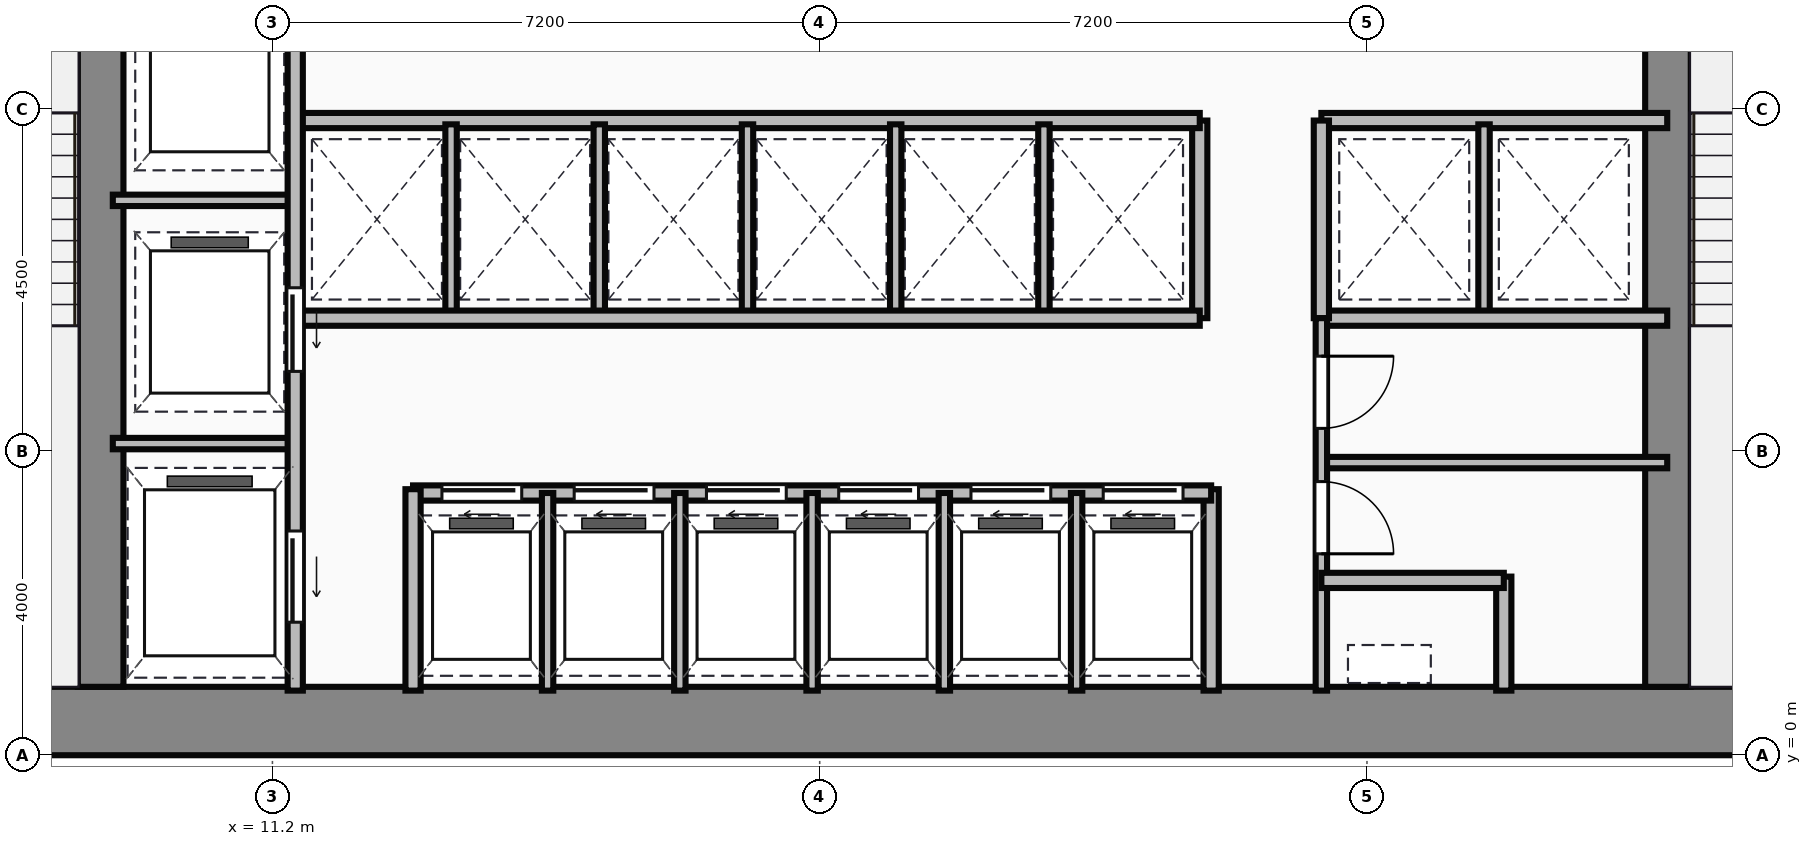
"""IFC4 building model, lengths in metres.
Left out: names, types, materials, properties, quantities, classifications, styles, units other than length and angle.
Written with IfcOpenShell. Run it as: python <this file> out.ifc"""

import sys

from ifc_helpers import new_model, si_unit, direction, frame, frame_2d, origin, place, context, subcontext, project, spatial, rectangle, extrude, source, transform, mapped, element, fill, save


model = new_model("IFC4")
c1 = context("Model", 3, precision=1e-05, world=origin(), true_north=direction((0.0, 1.0)))
c2 = subcontext(c1, "Body", "Model", "MODEL_VIEW")
j1 = project(units=[si_unit("LENGTHUNIT", "METRE"), si_unit("PLANEANGLEUNIT", "RADIAN")], contexts=[c1])
p1 = place(None, origin())
s1 = spatial("IfcSite", under=j1, at=p1, CompositionType="ELEMENT")
p2 = place(p1, origin())
s2 = spatial("IfcBuilding", under=s1, at=p2, CompositionType="ELEMENT")
p3 = place(p2, frame((0.0, 0.0, 47.1)))
s3 = spatial("IfcBuildingStorey", under=s2, at=p3, CompositionType="ELEMENT", Elevation=47.1)
m1 = source(origin(), c2, "Body", "SweptSolid", [
    extrude(rectangle(XDim=29.5, YDim=0.9, at=frame_2d((14.75, 0.0))), origin(), (0.0, 0.0, 1.0), 3.65),
])
p4 = place(p3, frame((4.5, 0.45, 0.0), z_axis=(0.0, 0.0, 1.0), x_axis=(1.0, 0.0, 0.0)))
e1 = element("IfcWall", 1, at=p4, inside=s3, PredefinedType="SHEAR", context=c2, shape_type="MappedRepresentation", body=[
    mapped(m1, transform((0.0, 0.0, 0.0))),
])
m2 = source(origin(), c2, "Body", "SweptSolid", [
    extrude(rectangle(XDim=12.2, YDim=0.6, at=frame_2d((6.1, 0.0))), origin(), (0.0, 0.0, 1.0), 3.65),
])
for number, where, z_axis, x_axis in (
    (2, (8.94, 0.9, 0.0), (0.0, 0.0, 1.0), (0.0, 1.0, 0.0)),
    (3, (29.56, 0.9, 0.0), (0.0, 0.0, 1.0), (0.0, 1.0, 0.0)),
):
    element("IfcWall", number, at=place(p3, frame(where, z_axis=z_axis, x_axis=x_axis)), inside=s3, PredefinedType="SHEAR", context=c2, shape_type="MappedRepresentation", body=[
        mapped(m2, transform((0.0, 0.0, 0.0))),
    ])
m3 = source(origin(), c2, "Body", "SweptSolid", [
    extrude(rectangle(XDim=9.6, YDim=0.2, at=frame_2d((4.8, 0.0))), origin(), (0.0, 0.0, 1.0), 3.4),
])
p5 = place(p3, frame((11.5, 0.85, 0.0), z_axis=(0.0, 0.0, 1.0), x_axis=(0.0, 1.0, 0.0)))
e4 = element("IfcWall", 4, at=p5, inside=s3, PredefinedType="PARTITIONING", context=c2, shape_type="MappedRepresentation", body=[
    mapped(m3, transform((0.0, 0.0, 0.0))),
])
p6 = place(p5, frame((4.2, 0.0, 0.0)))
e5 = element("IfcOpeningElement", 5, at=p6, cuts=e4, PredefinedType="OPENING", context=c2, shape_type="SweptSolid", body=[
    extrude(rectangle(XDim=1.1, YDim=2.15, at=frame_2d((0.55, 1.075))), frame((0.0, 0.11, 0.0), z_axis=(0.0, -1.0, 0.0), x_axis=(1.0, 0.0, 0.0)), (0.0, 0.0, 1.0), 0.22),
])
p7 = place(p5, frame((0.9, 0.0, 0.0)))
e6 = element("IfcOpeningElement", 6, at=p7, cuts=e4, PredefinedType="OPENING", context=c2, shape_type="SweptSolid", body=[
    extrude(rectangle(XDim=1.2, YDim=2.15, at=frame_2d((0.6, 1.075))), frame((0.0, 0.11, 0.0), z_axis=(0.0, -1.0, 0.0), x_axis=(1.0, 0.0, 0.0)), (0.0, 0.0, 1.0), 0.22),
])
m4 = source(origin(), c2, "Body", "SweptSolid", [
    extrude(rectangle(XDim=2.4, YDim=0.15, at=frame_2d((1.2, 0.0))), origin(), (0.0, 0.0, 1.0), 3.4),
])
for number, where, z_axis, x_axis in (
    (7, (9.1, 4.1, 0.0), (0.0, 0.0, 1.0), (1.0, 0.0, 0.0)),
    (8, (9.1, 7.3, 0.0), (0.0, 0.0, 1.0), (1.0, 0.0, 0.0)),
):
    element("IfcWall", number, at=place(p3, frame(where, z_axis=z_axis, x_axis=x_axis)), inside=s3, PredefinedType="PARTITIONING", context=c2, shape_type="MappedRepresentation", body=[
        mapped(m4, transform((0.0, 0.0, 0.0))),
    ])
m5 = source(origin(), c2, "Body", "SweptSolid", [
    extrude(rectangle(XDim=2.65, YDim=0.2, at=frame_2d((1.325, 0.0))), origin(), (0.0, 0.0, 1.0), 3.4),
])
p8 = place(p3, frame((13.05, 0.85, 0.0), z_axis=(0.0, 0.0, 1.0), x_axis=(0.0, 1.0, 0.0)))
e9 = element("IfcWall", 9, at=p8, inside=s3, PredefinedType="PARTITIONING", context=c2, shape_type="MappedRepresentation", body=[
    mapped(m5, transform((0.0, 0.0, 0.0))),
])
m6 = source(origin(), c2, "Body", "SweptSolid", [
    extrude(rectangle(XDim=10.5, YDim=0.2, at=frame_2d((5.25, 0.0))), origin(), (0.0, 0.0, 1.0), 3.4),
])
p9 = place(p3, frame((13.05, 3.45, 0.0), z_axis=(0.0, 0.0, 1.0), x_axis=(1.0, 0.0, 0.0)))
e10 = element("IfcWall", 10, at=p9, inside=s3, PredefinedType="PARTITIONING", context=c2, shape_type="MappedRepresentation", body=[
    mapped(m6, transform((0.0, 0.0, 0.0))),
])
p10 = place(p9, frame((0.38, 0.0, 0.0)))
e11 = element("IfcOpeningElement", 11, at=p10, cuts=e10, PredefinedType="OPENING", context=c2, shape_type="SweptSolid", body=[
    extrude(rectangle(XDim=1.05, YDim=2.15, at=frame_2d((0.525, 1.075))), frame((0.0, 0.11, 0.0), z_axis=(0.0, -1.0, 0.0), x_axis=(1.0, 0.0, 0.0)), (0.0, 0.0, 1.0), 0.22),
])
p11 = place(p9, frame((2.12, 0.0, 0.0)))
e12 = element("IfcOpeningElement", 12, at=p11, cuts=e10, PredefinedType="OPENING", context=c2, shape_type="SweptSolid", body=[
    extrude(rectangle(XDim=1.05, YDim=2.15, at=frame_2d((0.525, 1.075))), frame((0.0, 0.11, 0.0), z_axis=(0.0, -1.0, 0.0), x_axis=(1.0, 0.0, 0.0)), (0.0, 0.0, 1.0), 0.22),
])
p12 = place(p9, frame((3.86, 0.0, 0.0)))
e13 = element("IfcOpeningElement", 13, at=p12, cuts=e10, PredefinedType="OPENING", context=c2, shape_type="SweptSolid", body=[
    extrude(rectangle(XDim=1.05, YDim=2.15, at=frame_2d((0.525, 1.075))), frame((0.0, 0.11, 0.0), z_axis=(0.0, -1.0, 0.0), x_axis=(1.0, 0.0, 0.0)), (0.0, 0.0, 1.0), 0.22),
])
p13 = place(p9, frame((5.6, 0.0, 0.0)))
e14 = element("IfcOpeningElement", 14, at=p13, cuts=e10, PredefinedType="OPENING", context=c2, shape_type="SweptSolid", body=[
    extrude(rectangle(XDim=1.05, YDim=2.15, at=frame_2d((0.525, 1.075))), frame((0.0, 0.11, 0.0), z_axis=(0.0, -1.0, 0.0), x_axis=(1.0, 0.0, 0.0)), (0.0, 0.0, 1.0), 0.22),
])
p14 = place(p9, frame((7.34, 0.0, 0.0)))
e15 = element("IfcOpeningElement", 15, at=p14, cuts=e10, PredefinedType="OPENING", context=c2, shape_type="SweptSolid", body=[
    extrude(rectangle(XDim=1.05, YDim=2.15, at=frame_2d((0.525, 1.075))), frame((0.0, 0.11, 0.0), z_axis=(0.0, -1.0, 0.0), x_axis=(1.0, 0.0, 0.0)), (0.0, 0.0, 1.0), 0.22),
])
p15 = place(p9, frame((9.08, 0.0, 0.0)))
e16 = element("IfcOpeningElement", 16, at=p15, cuts=e10, PredefinedType="OPENING", context=c2, shape_type="SweptSolid", body=[
    extrude(rectangle(XDim=1.05, YDim=2.15, at=frame_2d((0.525, 1.075))), frame((0.0, 0.11, 0.0), z_axis=(0.0, -1.0, 0.0), x_axis=(1.0, 0.0, 0.0)), (0.0, 0.0, 1.0), 0.22),
])
p16 = place(p3, frame((23.55, 0.85, 0.0), z_axis=(0.0, 0.0, 1.0), x_axis=(0.0, 1.0, 0.0)))
e17 = element("IfcWall", 17, at=p16, inside=s3, PredefinedType="PARTITIONING", context=c2, shape_type="MappedRepresentation", body=[
    mapped(m5, transform((0.0, 0.0, 0.0))),
])
m7 = source(origin(), c2, "Body", "SweptSolid", [
    extrude(rectangle(XDim=2.6, YDim=0.15, at=frame_2d((1.3, 0.0))), origin(), (0.0, 0.0, 1.0), 3.4),
])
for number, where, z_axis, x_axis in (
    (18, (14.82, 0.85, 0.0), (0.0, 0.0, 1.0), (0.0, 1.0, 0.0)),
    (19, (16.56, 0.85, 0.0), (0.0, 0.0, 1.0), (0.0, 1.0, 0.0)),
    (20, (18.3, 0.85, 0.0), (0.0, 0.0, 1.0), (0.0, 1.0, 0.0)),
    (21, (20.04, 0.85, 0.0), (0.0, 0.0, 1.0), (0.0, 1.0, 0.0)),
    (22, (21.78, 0.85, 0.0), (0.0, 0.0, 1.0), (0.0, 1.0, 0.0)),
):
    element("IfcWall", number, at=place(p3, frame(where, z_axis=z_axis, x_axis=x_axis)), inside=s3, PredefinedType="PARTITIONING", context=c2, shape_type="MappedRepresentation", body=[
        mapped(m7, transform((0.0, 0.0, 0.0))),
    ])
m8 = source(origin(), c2, "Body", "SweptSolid", [
    extrude(rectangle(XDim=11.85, YDim=0.2, at=frame_2d((5.925, 0.0))), origin(), (0.0, 0.0, 1.0), 3.4),
])
for number, where, z_axis, x_axis in (
    (23, (11.55, 5.75, 0.0), (0.0, 0.0, 1.0), (1.0, 0.0, 0.0)),
    (24, (11.55, 8.35, 0.0), (0.0, 0.0, 1.0), (1.0, 0.0, 0.0)),
):
    element("IfcWall", number, at=place(p3, frame(where, z_axis=z_axis, x_axis=x_axis)), inside=s3, PredefinedType="PARTITIONING", context=c2, shape_type="MappedRepresentation", body=[
        mapped(m8, transform((0.0, 0.0, 0.0))),
    ])
m9 = source(origin(), c2, "Body", "SweptSolid", [
    extrude(rectangle(XDim=2.6, YDim=0.2, at=frame_2d((1.3, 0.0))), origin(), (0.0, 0.0, 1.0), 3.4),
])
p17 = place(p3, frame((23.4, 5.75, 0.0), z_axis=(0.0, 0.0, 1.0), x_axis=(0.0, 1.0, 0.0)))
e25 = element("IfcWall", 25, at=p17, inside=s3, PredefinedType="PARTITIONING", context=c2, shape_type="MappedRepresentation", body=[
    mapped(m9, transform((0.0, 0.0, 0.0))),
])
m10 = source(origin(), c2, "Body", "SweptSolid", [
    extrude(rectangle(XDim=2.5, YDim=0.15, at=frame_2d((1.25, 0.0))), origin(), (0.0, 0.0, 1.0), 3.4),
])
for number, where, z_axis, x_axis in (
    (26, (13.55, 5.8, 0.0), (0.0, 0.0, 1.0), (0.0, 1.0, 0.0)),
    (27, (15.5, 5.8, 0.0), (0.0, 0.0, 1.0), (0.0, 1.0, 0.0)),
    (28, (17.45, 5.8, 0.0), (0.0, 0.0, 1.0), (0.0, 1.0, 0.0)),
    (29, (19.4, 5.8, 0.0), (0.0, 0.0, 1.0), (0.0, 1.0, 0.0)),
    (30, (21.35, 5.8, 0.0), (0.0, 0.0, 1.0), (0.0, 1.0, 0.0)),
):
    element("IfcWall", number, at=place(p3, frame(where, z_axis=z_axis, x_axis=x_axis)), inside=s3, PredefinedType="PARTITIONING", context=c2, shape_type="MappedRepresentation", body=[
        mapped(m10, transform((0.0, 0.0, 0.0))),
    ])
m11 = source(origin(), c2, "Body", "SweptSolid", [
    extrude(rectangle(XDim=4.55, YDim=0.2, at=frame_2d((2.275, 0.0))), origin(), (0.0, 0.0, 1.0), 3.4),
])
for number, where, z_axis, x_axis in (
    (31, (25.0, 8.35, 0.0), (0.0, 0.0, 1.0), (1.0, 0.0, 0.0)),
    (32, (25.0, 5.75, 0.0), (0.0, 0.0, 1.0), (1.0, 0.0, 0.0)),
):
    element("IfcWall", number, at=place(p3, frame(where, z_axis=z_axis, x_axis=x_axis)), inside=s3, PredefinedType="PARTITIONING", context=c2, shape_type="MappedRepresentation", body=[
        mapped(m11, transform((0.0, 0.0, 0.0))),
    ])
p18 = place(p3, frame((25.0, 5.75, 0.0), z_axis=(0.0, 0.0, 1.0), x_axis=(0.0, 1.0, 0.0)))
e33 = element("IfcWall", 33, at=p18, inside=s3, PredefinedType="PARTITIONING", context=c2, shape_type="MappedRepresentation", body=[
    mapped(m9, transform((0.0, 0.0, 0.0))),
])
p19 = place(p3, frame((27.14, 5.8, 0.0), z_axis=(0.0, 0.0, 1.0), x_axis=(0.0, 1.0, 0.0)))
e34 = element("IfcWall", 34, at=p19, inside=s3, PredefinedType="PARTITIONING", context=c2, shape_type="MappedRepresentation", body=[
    mapped(m10, transform((0.0, 0.0, 0.0))),
])
m12 = source(origin(), c2, "Body", "SweptSolid", [
    extrude(rectangle(XDim=4.9, YDim=0.15, at=frame_2d((2.45, 0.0))), origin(), (0.0, 0.0, 1.0), 3.4),
])
p20 = place(p3, frame((25.0, 0.85, 0.0), z_axis=(0.0, 0.0, 1.0), x_axis=(0.0, 1.0, 0.0)))
e35 = element("IfcWall", 35, at=p20, inside=s3, PredefinedType="PARTITIONING", context=c2, shape_type="MappedRepresentation", body=[
    mapped(m12, transform((0.0, 0.0, 0.0))),
])
p21 = place(p20, frame((1.8, 0.0, 0.0)))
e36 = element("IfcOpeningElement", 36, at=p21, cuts=e35, PredefinedType="OPENING", context=c2, shape_type="SweptSolid", body=[
    extrude(rectangle(XDim=0.95, YDim=2.15, at=frame_2d((0.475, 1.075))), frame((0.0, 0.085, 0.0), z_axis=(0.0, -1.0, 0.0), x_axis=(1.0, 0.0, 0.0)), (0.0, 0.0, 1.0), 0.17),
])
p22 = place(p20, frame((3.45, 0.0, 0.0)))
e37 = element("IfcOpeningElement", 37, at=p22, cuts=e35, PredefinedType="OPENING", context=c2, shape_type="SweptSolid", body=[
    extrude(rectangle(XDim=0.95, YDim=2.15, at=frame_2d((0.475, 1.075))), frame((0.0, 0.085, 0.0), z_axis=(0.0, -1.0, 0.0), x_axis=(1.0, 0.0, 0.0)), (0.0, 0.0, 1.0), 0.17),
])
m13 = source(origin(), c2, "Body", "SweptSolid", [
    extrude(rectangle(XDim=2.4, YDim=0.2, at=frame_2d((1.2, 0.0))), origin(), (0.0, 0.0, 1.0), 3.4),
])
p23 = place(p3, frame((25.0, 2.3, 0.0), z_axis=(0.0, 0.0, 1.0), x_axis=(1.0, 0.0, 0.0)))
e38 = element("IfcWall", 38, at=p23, inside=s3, PredefinedType="PARTITIONING", context=c2, shape_type="MappedRepresentation", body=[
    mapped(m13, transform((0.0, 0.0, 0.0))),
])
m14 = source(origin(), c2, "Body", "SweptSolid", [
    extrude(rectangle(XDim=1.5, YDim=0.2, at=frame_2d((0.75, 0.0))), origin(), (0.0, 0.0, 1.0), 3.4),
])
p24 = place(p3, frame((27.4, 0.85, 0.0), z_axis=(0.0, 0.0, 1.0), x_axis=(0.0, 1.0, 0.0)))
e39 = element("IfcWall", 39, at=p24, inside=s3, PredefinedType="PARTITIONING", context=c2, shape_type="MappedRepresentation", body=[
    mapped(m14, transform((0.0, 0.0, 0.0))),
])
m15 = source(origin(), c2, "Body", "SweptSolid", [
    extrude(rectangle(XDim=4.55, YDim=0.15, at=frame_2d((2.275, 0.0))), origin(), (0.0, 0.0, 1.0), 3.4),
])
p25 = place(p3, frame((25.0, 3.85, 0.0), z_axis=(0.0, 0.0, 1.0), x_axis=(1.0, 0.0, 0.0)))
e40 = element("IfcWall", 40, at=p25, inside=s3, PredefinedType="PARTITIONING", context=c2, shape_type="MappedRepresentation", body=[
    mapped(m15, transform((0.0, 0.0, 0.0))),
])
m16 = source(origin(), c2, "Body", "SweptSolid", [
    extrude(rectangle(XDim=1.1, YDim=2.15, at=frame_2d((0.55, 1.075))), frame((0.0, 0.025, 0.0), z_axis=(0.0, -1.0, 0.0), x_axis=(1.0, 0.0, 0.0)), (0.0, 0.0, 1.0), 0.05),
])
p26 = place(p6, frame((1.1, 0.0, 0.0), z_axis=(0.0, 0.0, 1.0), x_axis=(-1.0, 0.0, 0.0)))
e41 = element("IfcDoor", 41, at=p26, inside=s3, OperationType="SLIDING_TO_LEFT", PredefinedType="DOOR", context=c2, shape_type="MappedRepresentation", body=[
    mapped(m16, transform((0.0, 0.0, 0.0))),
])
fill(e5, e41)
m17 = source(origin(), c2, "Body", "SweptSolid", [
    extrude(rectangle(XDim=1.2, YDim=2.15, at=frame_2d((0.6, 1.075))), frame((0.0, 0.025, 0.0), z_axis=(0.0, -1.0, 0.0), x_axis=(1.0, 0.0, 0.0)), (0.0, 0.0, 1.0), 0.05),
])
p27 = place(p7, frame((1.2, 0.0, 0.0), z_axis=(0.0, 0.0, 1.0), x_axis=(-1.0, 0.0, 0.0)))
e42 = element("IfcDoor", 42, at=p27, inside=s3, OperationType="SLIDING_TO_LEFT", PredefinedType="DOOR", context=c2, shape_type="MappedRepresentation", body=[
    mapped(m17, transform((0.0, 0.0, 0.0))),
])
fill(e6, e42)
m18 = source(origin(), c2, "Body", "SweptSolid", [
    extrude(rectangle(XDim=1.05, YDim=2.15, at=frame_2d((0.525, 1.075))), frame((0.0, 0.025, 0.0), z_axis=(0.0, -1.0, 0.0), x_axis=(1.0, 0.0, 0.0)), (0.0, 0.0, 1.0), 0.05),
])
p28 = place(p10, origin())
e43 = element("IfcDoor", 43, at=p28, inside=s3, OperationType="SLIDING_TO_LEFT", PredefinedType="DOOR", context=c2, shape_type="MappedRepresentation", body=[
    mapped(m18, transform((0.0, 0.0, 0.0))),
])
fill(e11, e43)
p29 = place(p11, origin())
e44 = element("IfcDoor", 44, at=p29, inside=s3, OperationType="SLIDING_TO_LEFT", PredefinedType="DOOR", context=c2, shape_type="MappedRepresentation", body=[
    mapped(m18, transform((0.0, 0.0, 0.0))),
])
fill(e12, e44)
p30 = place(p12, origin())
e45 = element("IfcDoor", 45, at=p30, inside=s3, OperationType="SLIDING_TO_LEFT", PredefinedType="DOOR", context=c2, shape_type="MappedRepresentation", body=[
    mapped(m18, transform((0.0, 0.0, 0.0))),
])
fill(e13, e45)
p31 = place(p13, origin())
e46 = element("IfcDoor", 46, at=p31, inside=s3, OperationType="SLIDING_TO_LEFT", PredefinedType="DOOR", context=c2, shape_type="MappedRepresentation", body=[
    mapped(m18, transform((0.0, 0.0, 0.0))),
])
fill(e14, e46)
p32 = place(p14, origin())
e47 = element("IfcDoor", 47, at=p32, inside=s3, OperationType="SLIDING_TO_LEFT", PredefinedType="DOOR", context=c2, shape_type="MappedRepresentation", body=[
    mapped(m18, transform((0.0, 0.0, 0.0))),
])
fill(e15, e47)
p33 = place(p15, origin())
e48 = element("IfcDoor", 48, at=p33, inside=s3, OperationType="SLIDING_TO_LEFT", PredefinedType="DOOR", context=c2, shape_type="MappedRepresentation", body=[
    mapped(m18, transform((0.0, 0.0, 0.0))),
])
fill(e16, e48)
m19 = source(origin(), c2, "Body", "SweptSolid", [
    extrude(rectangle(XDim=0.95, YDim=2.15, at=frame_2d((0.475, 1.075))), frame((0.0, 0.025, 0.0), z_axis=(0.0, -1.0, 0.0), x_axis=(1.0, 0.0, 0.0)), (0.0, 0.0, 1.0), 0.05),
])
p34 = place(p21, origin())
e49 = element("IfcDoor", 49, at=p34, inside=s3, OperationType="SINGLE_SWING_LEFT", PredefinedType="DOOR", context=c2, shape_type="MappedRepresentation", body=[
    mapped(m19, transform((0.0, 0.0, 0.0))),
])
fill(e36, e49)
p35 = place(p22, origin())
e50 = element("IfcDoor", 50, at=p35, inside=s3, OperationType="SINGLE_SWING_RIGHT", PredefinedType="DOOR", context=c2, shape_type="MappedRepresentation", body=[
    mapped(m19, transform((0.0, 0.0, 0.0))),
])
fill(e37, e50)
save(model, sys.argv[1])
